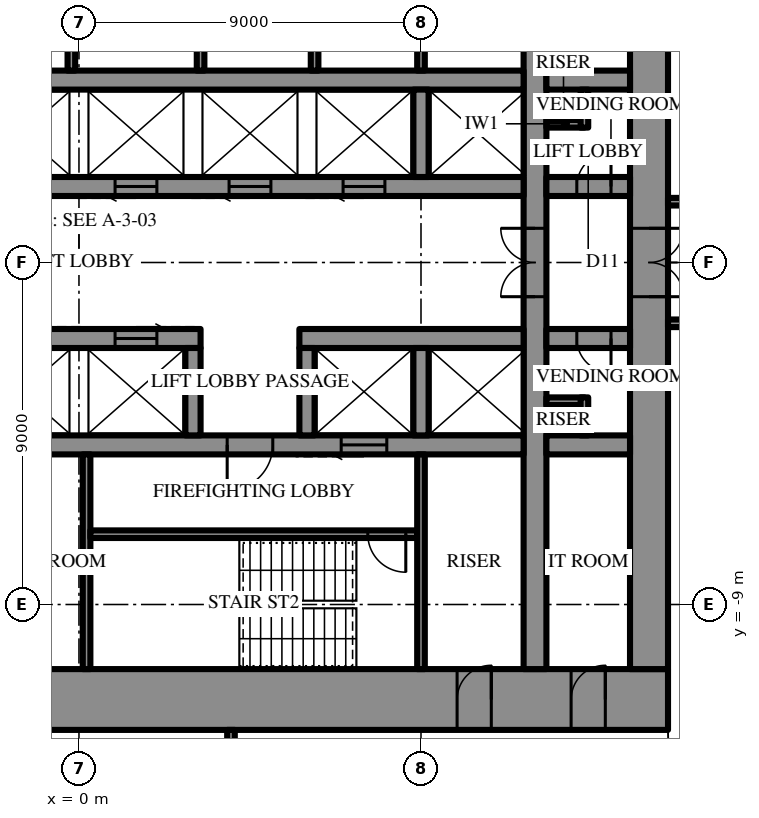
"""IFC4 building model, lengths in metres.
Left out: names, types, materials, properties, quantities, classifications, styles, units other than length and angle.
Written with IfcOpenShell. Run it as: python <this file> out.ifc"""

import sys

from ifc_helpers import new_model, si_unit, direction, frame, frame_2d, origin, place, context, subcontext, project, spatial, rectangle, extrude, element, fill, save


model = new_model("IFC4")
c1 = context("Model", 3, precision=1e-05, world=origin(), true_north=direction((0.0, 1.0)))
c2 = subcontext(c1, "Body", "Model", "MODEL_VIEW")
j1 = project(units=[si_unit("LENGTHUNIT", "METRE"), si_unit("PLANEANGLEUNIT", "RADIAN")], contexts=[c1])
p1 = place(None, origin())
s1 = spatial("IfcSite", under=j1, at=p1, CompositionType="ELEMENT")
p2 = place(p1, origin())
s2 = spatial("IfcBuilding", under=s1, at=p2, CompositionType="ELEMENT")
p3 = place(p2, frame((0.0, 0.0, 223.9)))
s3 = spatial("IfcBuildingStorey", under=s2, at=p3, CompositionType="ELEMENT", Elevation=223.9)
p4 = place(p3, frame((15.5, -11.5, 0.0), z_axis=(0.0, 0.0, 1.0), x_axis=(-1.0, 0.0, 0.0)))
e1 = element("IfcWall", 1, at=p4, inside=s3, PredefinedType="SHEAR", context=c2, shape_type="SweptSolid", body=[
    extrude(rectangle(XDim=31.0, YDim=1.6, at=frame_2d((15.5, 0.0))), origin(), (0.0, 0.0, 1.0), 4.2),
])
p5 = place(p4, frame((16.35, 0.0, 0.0)))
e2 = element("IfcOpeningElement", 2, at=p5, cuts=e1, PredefinedType="OPENING", context=c2, shape_type="SweptSolid", body=[
    extrude(rectangle(XDim=0.9, YDim=2.2, at=frame_2d((0.45, 1.1))), frame((0.0, 0.81, 0.0), z_axis=(0.0, -1.0, 0.0), x_axis=(1.0, 0.0, 0.0)), (0.0, 0.0, 1.0), 1.62),
])
p6 = place(p4, frame((19.35, 0.0, 0.0)))
e3 = element("IfcOpeningElement", 3, at=p6, cuts=e1, PredefinedType="OPENING", context=c2, shape_type="SweptSolid", body=[
    extrude(rectangle(XDim=0.9, YDim=2.2, at=frame_2d((0.45, 1.1))), frame((0.0, 0.81, 0.0), z_axis=(0.0, -1.0, 0.0), x_axis=(1.0, 0.0, 0.0)), (0.0, 0.0, 1.0), 1.62),
])
p7 = place(p4, frame((22.4, 0.0, 0.0)))
e4 = element("IfcOpeningElement", 4, at=p7, cuts=e1, PredefinedType="OPENING", context=c2, shape_type="SweptSolid", body=[
    extrude(rectangle(XDim=1.0, YDim=2.2, at=frame_2d((0.5, 1.1))), frame((0.0, 0.81, 0.0), z_axis=(0.0, -1.0, 0.0), x_axis=(1.0, 0.0, 0.0)), (0.0, 0.0, 1.0), 1.62),
])
p8 = place(p4, frame((1.65, 0.0, 0.0)))
e5 = element("IfcOpeningElement", 5, at=p8, cuts=e1, PredefinedType="OPENING", context=c2, shape_type="SweptSolid", body=[
    extrude(rectangle(XDim=0.9, YDim=2.2, at=frame_2d((0.45, 1.1))), frame((0.0, 0.81, 0.0), z_axis=(0.0, -1.0, 0.0), x_axis=(1.0, 0.0, 0.0)), (0.0, 0.0, 1.0), 1.62),
])
p9 = place(p4, frame((4.65, 0.0, 0.0)))
e6 = element("IfcOpeningElement", 6, at=p9, cuts=e1, PredefinedType="OPENING", context=c2, shape_type="SweptSolid", body=[
    extrude(rectangle(XDim=0.9, YDim=2.2, at=frame_2d((0.45, 1.1))), frame((0.0, 0.81, 0.0), z_axis=(0.0, -1.0, 0.0), x_axis=(1.0, 0.0, 0.0)), (0.0, 0.0, 1.0), 1.62),
])
p10 = place(p4, frame((25.45, 0.0, 0.0)))
e7 = element("IfcOpeningElement", 7, at=p10, cuts=e1, PredefinedType="OPENING", context=c2, shape_type="SweptSolid", body=[
    extrude(rectangle(XDim=0.9, YDim=2.2, at=frame_2d((0.45, 1.1))), frame((0.0, 0.81, 0.0), z_axis=(0.0, -1.0, 0.0), x_axis=(1.0, 0.0, 0.0)), (0.0, 0.0, 1.0), 1.62),
])
p11 = place(p4, frame((28.45, 0.0, 0.0)))
e8 = element("IfcOpeningElement", 8, at=p11, cuts=e1, PredefinedType="OPENING", context=c2, shape_type="SweptSolid", body=[
    extrude(rectangle(XDim=0.9, YDim=2.2, at=frame_2d((0.45, 1.1))), frame((0.0, 0.81, 0.0), z_axis=(0.0, -1.0, 0.0), x_axis=(1.0, 0.0, 0.0)), (0.0, 0.0, 1.0), 1.62),
])
p12 = place(p3, frame((15.0, -10.7, 0.0), z_axis=(0.0, 0.0, 1.0), x_axis=(0.0, 1.0, 0.0)))
e9 = element("IfcWall", 9, at=p12, inside=s3, PredefinedType="SHEAR", context=c2, shape_type="SweptSolid", body=[
    extrude(rectangle(XDim=21.4, YDim=1.0, at=frame_2d((10.7, 0.0))), origin(), (0.0, 0.0, 1.0), 4.2),
])
p13 = place(p12, frame((9.8, 0.0, 0.0)))
e10 = element("IfcOpeningElement", 10, at=p13, cuts=e9, PredefinedType="OPENING", context=c2, shape_type="SweptSolid", body=[
    extrude(rectangle(XDim=1.8, YDim=2.4, at=frame_2d((0.9, 1.2))), frame((0.0, 0.51, 0.0), z_axis=(0.0, -1.0, 0.0), x_axis=(1.0, 0.0, 0.0)), (0.0, 0.0, 1.0), 1.02),
])
p14 = place(p3, frame((12.0, -10.7, 0.0), z_axis=(0.0, 0.0, 1.0), x_axis=(0.0, 1.0, 0.0)))
e11 = element("IfcWall", 11, at=p14, inside=s3, PredefinedType="SHEAR", context=c2, shape_type="SweptSolid", body=[
    extrude(rectangle(XDim=21.4, YDim=0.6, at=frame_2d((10.7, 0.0))), origin(), (0.0, 0.0, 1.0), 4.2),
])
p15 = place(p14, frame((9.8, 0.0, 0.0)))
e12 = element("IfcOpeningElement", 12, at=p15, cuts=e11, PredefinedType="OPENING", context=c2, shape_type="SweptSolid", body=[
    extrude(rectangle(XDim=1.8, YDim=2.4, at=frame_2d((0.9, 1.2))), frame((0.0, 0.31, 0.0), z_axis=(0.0, -1.0, 0.0), x_axis=(1.0, 0.0, 0.0)), (0.0, 0.0, 1.0), 0.62),
])
p16 = place(p3, frame((-3.2, 2.0, 0.0), z_axis=(0.0, 0.0, 1.0), x_axis=(1.0, 0.0, 0.0)))
e13 = element("IfcWall", 13, at=p16, inside=s3, PredefinedType="SHEAR", context=c2, shape_type="SweptSolid", body=[
    extrude(rectangle(XDim=14.9, YDim=0.5, at=frame_2d((7.45, 0.0))), origin(), (0.0, 0.0, 1.0), 4.2),
])
p17 = place(p16, frame((1.15, 0.0, 0.0)))
e14 = element("IfcOpeningElement", 14, at=p17, cuts=e13, PredefinedType="OPENING", context=c2, shape_type="SweptSolid", body=[
    extrude(rectangle(XDim=1.1, YDim=2.2, at=frame_2d((0.55, 1.1))), frame((0.0, 0.26, 0.0), z_axis=(0.0, -1.0, 0.0), x_axis=(1.0, 0.0, 0.0)), (0.0, 0.0, 1.0), 0.52),
])
p18 = place(p16, frame((4.15, 0.0, 0.0)))
e15 = element("IfcOpeningElement", 15, at=p18, cuts=e13, PredefinedType="OPENING", context=c2, shape_type="SweptSolid", body=[
    extrude(rectangle(XDim=1.1, YDim=2.2, at=frame_2d((0.55, 1.1))), frame((0.0, 0.26, 0.0), z_axis=(0.0, -1.0, 0.0), x_axis=(1.0, 0.0, 0.0)), (0.0, 0.0, 1.0), 0.52),
])
p19 = place(p16, frame((7.15, 0.0, 0.0)))
e16 = element("IfcOpeningElement", 16, at=p19, cuts=e13, PredefinedType="OPENING", context=c2, shape_type="SweptSolid", body=[
    extrude(rectangle(XDim=1.1, YDim=2.2, at=frame_2d((0.55, 1.1))), frame((0.0, 0.26, 0.0), z_axis=(0.0, -1.0, 0.0), x_axis=(1.0, 0.0, 0.0)), (0.0, 0.0, 1.0), 0.52),
])
p20 = place(p16, frame((10.15, 0.0, 0.0)))
e17 = element("IfcOpeningElement", 17, at=p20, cuts=e13, PredefinedType="OPENING", context=c2, shape_type="SweptSolid", body=[
    extrude(rectangle(XDim=1.1, YDim=2.2, at=frame_2d((0.55, 1.1))), frame((0.0, 0.26, 0.0), z_axis=(0.0, -1.0, 0.0), x_axis=(1.0, 0.0, 0.0)), (0.0, 0.0, 1.0), 0.52),
])
p21 = place(p3, frame((12.3, 2.0, 0.0), z_axis=(0.0, 0.0, 1.0), x_axis=(1.0, 0.0, 0.0)))
e18 = element("IfcWall", 18, at=p21, inside=s3, PredefinedType="SHEAR", context=c2, shape_type="SweptSolid", body=[
    extrude(rectangle(XDim=2.2, YDim=0.5, at=frame_2d((1.1, 0.0))), origin(), (0.0, 0.0, 1.0), 4.2),
])
p22 = place(p21, frame((0.8, 0.0, 0.0)))
e19 = element("IfcOpeningElement", 19, at=p22, cuts=e18, PredefinedType="OPENING", context=c2, shape_type="SweptSolid", body=[
    extrude(rectangle(XDim=0.9, YDim=2.2, at=frame_2d((0.45, 1.1))), frame((0.0, 0.26, 0.0), z_axis=(0.0, -1.0, 0.0), x_axis=(1.0, 0.0, 0.0)), (0.0, 0.0, 1.0), 0.52),
])
p23 = place(p3, frame((-11.7, 4.8, 0.0), z_axis=(0.0, 0.0, 1.0), x_axis=(1.0, 0.0, 0.0)))
e20 = element("IfcWall", 20, at=p23, inside=s3, PredefinedType="SHEAR", context=c2, shape_type="SweptSolid", body=[
    extrude(rectangle(XDim=23.4, YDim=0.5, at=frame_2d((11.7, 0.0))), origin(), (0.0, 0.0, 1.0), 4.2),
])
p24 = place(p23, frame((6.6, 0.0, 0.0)))
e21 = element("IfcOpeningElement", 21, at=p24, cuts=e20, PredefinedType="OPENING", context=c2, shape_type="SweptSolid", body=[
    extrude(rectangle(XDim=1.2, YDim=2.2, at=frame_2d((0.6, 1.1))), frame((0.0, 0.26, 0.0), z_axis=(0.0, -1.0, 0.0), x_axis=(1.0, 0.0, 0.0)), (0.0, 0.0, 1.0), 0.52),
])
p25 = place(p23, frame((3.6, 0.0, 0.0)))
e22 = element("IfcOpeningElement", 22, at=p25, cuts=e20, PredefinedType="OPENING", context=c2, shape_type="SweptSolid", body=[
    extrude(rectangle(XDim=1.2, YDim=2.2, at=frame_2d((0.6, 1.1))), frame((0.0, 0.26, 0.0), z_axis=(0.0, -1.0, 0.0), x_axis=(1.0, 0.0, 0.0)), (0.0, 0.0, 1.0), 0.52),
])
p26 = place(p3, frame((12.3, 4.8, 0.0), z_axis=(0.0, 0.0, 1.0), x_axis=(1.0, 0.0, 0.0)))
e23 = element("IfcWall", 23, at=p26, inside=s3, PredefinedType="SHEAR", context=c2, shape_type="SweptSolid", body=[
    extrude(rectangle(XDim=2.2, YDim=0.5, at=frame_2d((1.1, 0.0))), origin(), (0.0, 0.0, 1.0), 4.2),
])
p27 = place(p3, frame((9.0, 2.25, 0.0), z_axis=(0.0, 0.0, 1.0), x_axis=(0.0, 1.0, 0.0)))
e24 = element("IfcWall", 24, at=p27, inside=s3, PredefinedType="SHEAR", context=c2, shape_type="SweptSolid", body=[
    extrude(rectangle(XDim=2.3, YDim=0.4, at=frame_2d((1.15, 0.0))), origin(), (0.0, 0.0, 1.0), 4.2),
])
p28 = place(p3, frame((-0.2, 5.05, 0.0), z_axis=(0.0, 0.0, 1.0), x_axis=(0.0, 1.0, 0.0)))
e25 = element("IfcWall", 25, at=p28, inside=s3, PredefinedType="SHEAR", context=c2, shape_type="SweptSolid", body=[
    extrude(rectangle(XDim=5.65, YDim=0.2, at=frame_2d((2.825, 0.0))), origin(), (0.0, 0.0, 1.0), 4.2),
])
p29 = place(p3, frame((14.5, -2.0, 0.0), z_axis=(0.0, 0.0, 1.0), x_axis=(-1.0, 0.0, 0.0)))
e26 = element("IfcWall", 26, at=p29, inside=s3, PredefinedType="SHEAR", context=c2, shape_type="SweptSolid", body=[
    extrude(rectangle(XDim=2.2, YDim=0.5, at=frame_2d((1.1, 0.0))), origin(), (0.0, 0.0, 1.0), 4.2),
])
p30 = place(p29, frame((0.5, 0.0, 0.0)))
e27 = element("IfcOpeningElement", 27, at=p30, cuts=e26, PredefinedType="OPENING", context=c2, shape_type="SweptSolid", body=[
    extrude(rectangle(XDim=0.9, YDim=2.2, at=frame_2d((0.45, 1.1))), frame((0.0, 0.26, 0.0), z_axis=(0.0, -1.0, 0.0), x_axis=(1.0, 0.0, 0.0)), (0.0, 0.0, 1.0), 0.52),
])
p31 = place(p3, frame((11.7, -2.0, 0.0), z_axis=(0.0, 0.0, 1.0), x_axis=(-1.0, 0.0, 0.0)))
e28 = element("IfcWall", 28, at=p31, inside=s3, PredefinedType="SHEAR", context=c2, shape_type="SweptSolid", body=[
    extrude(rectangle(XDim=5.9, YDim=0.5, at=frame_2d((2.95, 0.0))), origin(), (0.0, 0.0, 1.0), 4.2),
])
p32 = place(p3, frame((3.2, -2.0, 0.0), z_axis=(0.0, 0.0, 1.0), x_axis=(-1.0, 0.0, 0.0)))
e29 = element("IfcWall", 29, at=p32, inside=s3, PredefinedType="SHEAR", context=c2, shape_type="SweptSolid", body=[
    extrude(rectangle(XDim=14.9, YDim=0.5, at=frame_2d((7.45, 0.0))), origin(), (0.0, 0.0, 1.0), 4.2),
])
p33 = place(p32, frame((1.15, 0.0, 0.0)))
e30 = element("IfcOpeningElement", 30, at=p33, cuts=e29, PredefinedType="OPENING", context=c2, shape_type="SweptSolid", body=[
    extrude(rectangle(XDim=1.1, YDim=2.2, at=frame_2d((0.55, 1.1))), frame((0.0, 0.26, 0.0), z_axis=(0.0, -1.0, 0.0), x_axis=(1.0, 0.0, 0.0)), (0.0, 0.0, 1.0), 0.52),
])
p34 = place(p32, frame((4.15, 0.0, 0.0)))
e31 = element("IfcOpeningElement", 31, at=p34, cuts=e29, PredefinedType="OPENING", context=c2, shape_type="SweptSolid", body=[
    extrude(rectangle(XDim=1.1, YDim=2.2, at=frame_2d((0.55, 1.1))), frame((0.0, 0.26, 0.0), z_axis=(0.0, -1.0, 0.0), x_axis=(1.0, 0.0, 0.0)), (0.0, 0.0, 1.0), 0.52),
])
p35 = place(p32, frame((7.15, 0.0, 0.0)))
e32 = element("IfcOpeningElement", 32, at=p35, cuts=e29, PredefinedType="OPENING", context=c2, shape_type="SweptSolid", body=[
    extrude(rectangle(XDim=1.1, YDim=2.2, at=frame_2d((0.55, 1.1))), frame((0.0, 0.26, 0.0), z_axis=(0.0, -1.0, 0.0), x_axis=(1.0, 0.0, 0.0)), (0.0, 0.0, 1.0), 0.52),
])
p36 = place(p32, frame((10.15, 0.0, 0.0)))
e33 = element("IfcOpeningElement", 33, at=p36, cuts=e29, PredefinedType="OPENING", context=c2, shape_type="SweptSolid", body=[
    extrude(rectangle(XDim=1.1, YDim=2.2, at=frame_2d((0.55, 1.1))), frame((0.0, 0.26, 0.0), z_axis=(0.0, -1.0, 0.0), x_axis=(1.0, 0.0, 0.0)), (0.0, 0.0, 1.0), 0.52),
])
p37 = place(p3, frame((14.5, -4.8, 0.0), z_axis=(0.0, 0.0, 1.0), x_axis=(-1.0, 0.0, 0.0)))
e34 = element("IfcWall", 34, at=p37, inside=s3, PredefinedType="SHEAR", context=c2, shape_type="SweptSolid", body=[
    extrude(rectangle(XDim=2.2, YDim=0.5, at=frame_2d((1.1, 0.0))), origin(), (0.0, 0.0, 1.0), 4.2),
])
p38 = place(p3, frame((11.7, -4.8, 0.0), z_axis=(0.0, 0.0, 1.0), x_axis=(-1.0, 0.0, 0.0)))
e35 = element("IfcWall", 35, at=p38, inside=s3, PredefinedType="SHEAR", context=c2, shape_type="SweptSolid", body=[
    extrude(rectangle(XDim=23.4, YDim=0.5, at=frame_2d((11.7, 0.0))), origin(), (0.0, 0.0, 1.0), 4.2),
])
p39 = place(p38, frame((6.6, 0.0, 0.0)))
e36 = element("IfcOpeningElement", 36, at=p39, cuts=e35, PredefinedType="OPENING", context=c2, shape_type="SweptSolid", body=[
    extrude(rectangle(XDim=1.2, YDim=2.2, at=frame_2d((0.6, 1.1))), frame((0.0, 0.26, 0.0), z_axis=(0.0, -1.0, 0.0), x_axis=(1.0, 0.0, 0.0)), (0.0, 0.0, 1.0), 0.52),
])
p40 = place(p38, frame((3.6, 0.0, 0.0)))
e37 = element("IfcOpeningElement", 37, at=p40, cuts=e35, PredefinedType="OPENING", context=c2, shape_type="SweptSolid", body=[
    extrude(rectangle(XDim=1.2, YDim=2.2, at=frame_2d((0.6, 1.1))), frame((0.0, 0.26, 0.0), z_axis=(0.0, -1.0, 0.0), x_axis=(1.0, 0.0, 0.0)), (0.0, 0.0, 1.0), 0.52),
])
for number, where, z_axis, x_axis in (
    (38, (9.0, -2.25, 0.0), (0.0, 0.0, 1.0), (0.0, -1.0, 0.0)),
    (39, (6.0, -2.25, 0.0), (0.0, 0.0, 1.0), (0.0, -1.0, 0.0)),
    (40, (3.0, -2.25, 0.0), (0.0, 0.0, 1.0), (0.0, -1.0, 0.0)),
):
    element("IfcWall", number, at=place(p3, frame(where, z_axis=z_axis, x_axis=x_axis)), inside=s3, PredefinedType="SHEAR", context=c2, shape_type="SweptSolid", body=[
        extrude(rectangle(XDim=2.3, YDim=0.4, at=frame_2d((1.15, 0.0))), origin(), (0.0, 0.0, 1.0), 4.2),
    ])
p41 = place(p3, frame((0.2, -5.05, 0.0), z_axis=(0.0, 0.0, 1.0), x_axis=(0.0, -1.0, 0.0)))
e41 = element("IfcWall", 41, at=p41, inside=s3, PredefinedType="SHEAR", context=c2, shape_type="SweptSolid", body=[
    extrude(rectangle(XDim=5.65, YDim=0.2, at=frame_2d((2.825, 0.0))), origin(), (0.0, 0.0, 1.0), 4.2),
])
p42 = place(p3, frame((8.9, -7.15, 0.0), z_axis=(0.0, 0.0, 1.0), x_axis=(-1.0, 0.0, 0.0)))
e42 = element("IfcWall", 42, at=p42, inside=s3, PredefinedType="SHEAR", context=c2, shape_type="SweptSolid", body=[
    extrude(rectangle(XDim=8.6, YDim=0.2, at=frame_2d((4.3, 0.0))), origin(), (0.0, 0.0, 1.0), 4.2),
])
p43 = place(p42, frame((0.3, 0.0, 0.0)))
e43 = element("IfcOpeningElement", 43, at=p43, cuts=e42, PredefinedType="OPENING", context=c2, shape_type="SweptSolid", body=[
    extrude(rectangle(XDim=1.0, YDim=2.2, at=frame_2d((0.5, 1.1))), frame((0.0, 0.11, 0.0), z_axis=(0.0, -1.0, 0.0), x_axis=(1.0, 0.0, 0.0)), (0.0, 0.0, 1.0), 0.22),
])
for number, where, z_axis, x_axis in (
    (44, (9.0, 5.05, 0.0), (0.0, 0.0, 1.0), (0.0, 1.0, 0.0)),
    (45, (3.2, 5.05, 0.0), (0.0, 0.0, 1.0), (0.0, 1.0, 0.0)),
    (46, (6.2, 5.05, 0.0), (0.0, 0.0, 1.0), (0.0, 1.0, 0.0)),
    (47, (9.0, -5.05, 0.0), (0.0, 0.0, 1.0), (0.0, -1.0, 0.0)),
):
    element("IfcWall", number, at=place(p3, frame(where, z_axis=z_axis, x_axis=x_axis)), inside=s3, PredefinedType="PARTITIONING", context=c2, shape_type="SweptSolid", body=[
        extrude(rectangle(XDim=5.65, YDim=0.2, at=frame_2d((2.825, 0.0))), origin(), (0.0, 0.0, 1.0), 4.0),
    ])
for number, where, z_axis, x_axis in (
    (48, (12.3, 3.65, 0.0), (0.0, 0.0, 1.0), (1.0, 0.0, 0.0)),
    (49, (13.3, 3.55, 0.0), (0.0, 0.0, 1.0), (0.0, 1.0, 0.0)),
    (50, (13.3, -3.65, 0.0), (0.0, 0.0, 1.0), (-1.0, 0.0, 0.0)),
    (51, (13.3, -3.55, 0.0), (0.0, 0.0, 1.0), (0.0, -1.0, 0.0)),
):
    element("IfcWall", number, at=place(p3, frame(where, z_axis=z_axis, x_axis=x_axis)), inside=s3, PredefinedType="PARTITIONING", context=c2, shape_type="SweptSolid", body=[
        extrude(rectangle(XDim=1.0, YDim=0.2, at=frame_2d((0.5, 0.0))), origin(), (0.0, 0.0, 1.0), 4.0),
    ])
for number, where, z_axis, x_axis in (
    (52, (15.5, 1.6, 0.0), (0.0, 0.0, 1.0), (1.0, 0.0, 0.0)),
    (53, (15.5, -1.6, 0.0), (0.0, 0.0, 1.0), (1.0, 0.0, 0.0)),
):
    element("IfcWall", number, at=place(p3, frame(where, z_axis=z_axis, x_axis=x_axis)), inside=s3, PredefinedType="PARTITIONING", context=c2, shape_type="SweptSolid", body=[
        extrude(rectangle(XDim=2.3, YDim=0.2, at=frame_2d((1.15, 0.0))), origin(), (0.0, 0.0, 1.0), 4.0),
    ])
p44 = place(p3, frame((4.0, -12.3, 0.0), z_axis=(0.0, 0.0, 1.0), x_axis=(0.0, -1.0, 0.0)))
e54 = element("IfcWall", 54, at=p44, inside=s3, PredefinedType="PARTITIONING", context=c2, shape_type="SweptSolid", body=[
    extrude(rectangle(XDim=15.35, YDim=0.2, at=frame_2d((7.675, 0.0))), origin(), (0.0, 0.0, 1.0), 4.0),
])
p45 = place(p13, frame((1.8, 0.0, 0.0), z_axis=(0.0, 0.0, 1.0), x_axis=(-1.0, 0.0, 0.0)))
e55 = element("IfcDoor", 55, at=p45, inside=s3, OperationType="DOUBLE_DOOR_SINGLE_SWING", PredefinedType="DOOR", context=c2, shape_type="SweptSolid", body=[
    extrude(rectangle(XDim=1.8, YDim=2.4, at=frame_2d((0.9, 1.2))), frame((0.0, 0.025, 0.0), z_axis=(0.0, -1.0, 0.0), x_axis=(1.0, 0.0, 0.0)), (0.0, 0.0, 1.0), 0.05),
])
fill(e10, e55)
p46 = place(p39, origin())
e56 = element("IfcDoor", 56, at=p46, inside=s3, OperationType="SINGLE_SWING_LEFT", PredefinedType="DOOR", context=c2, shape_type="SweptSolid", body=[
    extrude(rectangle(XDim=1.2, YDim=2.2, at=frame_2d((0.6, 1.1))), frame((0.0, 0.025, 0.0), z_axis=(0.0, -1.0, 0.0), x_axis=(1.0, 0.0, 0.0)), (0.0, 0.0, 1.0), 0.05),
])
fill(e36, e56)
p47 = place(p43, origin())
e57 = element("IfcDoor", 57, at=p47, inside=s3, OperationType="SINGLE_SWING_RIGHT", PredefinedType="DOOR", context=c2, shape_type="SweptSolid", body=[
    extrude(rectangle(XDim=1.0, YDim=2.2, at=frame_2d((0.5, 1.1))), frame((0.0, 0.025, 0.0), z_axis=(0.0, -1.0, 0.0), x_axis=(1.0, 0.0, 0.0)), (0.0, 0.0, 1.0), 0.05),
])
fill(e43, e57)
p48 = place(p8, frame((0.9, 0.0, 0.0), z_axis=(0.0, 0.0, 1.0), x_axis=(-1.0, 0.0, 0.0)))
e58 = element("IfcDoor", 58, at=p48, inside=s3, OperationType="SINGLE_SWING_LEFT", PredefinedType="DOOR", context=c2, shape_type="SweptSolid", body=[
    extrude(rectangle(XDim=0.9, YDim=2.2, at=frame_2d((0.45, 1.1))), frame((0.0, 0.025, 0.0), z_axis=(0.0, -1.0, 0.0), x_axis=(1.0, 0.0, 0.0)), (0.0, 0.0, 1.0), 0.05),
])
fill(e5, e58)
p49 = place(p9, frame((0.9, 0.0, 0.0), z_axis=(0.0, 0.0, 1.0), x_axis=(-1.0, 0.0, 0.0)))
e59 = element("IfcDoor", 59, at=p49, inside=s3, OperationType="SINGLE_SWING_LEFT", PredefinedType="DOOR", context=c2, shape_type="SweptSolid", body=[
    extrude(rectangle(XDim=0.9, YDim=2.2, at=frame_2d((0.45, 1.1))), frame((0.0, 0.025, 0.0), z_axis=(0.0, -1.0, 0.0), x_axis=(1.0, 0.0, 0.0)), (0.0, 0.0, 1.0), 0.05),
])
fill(e6, e59)
p50 = place(p22, origin())
e60 = element("IfcDoor", 60, at=p50, inside=s3, OperationType="SINGLE_SWING_LEFT", PredefinedType="DOOR", context=c2, shape_type="SweptSolid", body=[
    extrude(rectangle(XDim=0.9, YDim=2.2, at=frame_2d((0.45, 1.1))), frame((0.0, 0.025, 0.0), z_axis=(0.0, -1.0, 0.0), x_axis=(1.0, 0.0, 0.0)), (0.0, 0.0, 1.0), 0.05),
])
fill(e19, e60)
p51 = place(p30, origin())
e61 = element("IfcDoor", 61, at=p51, inside=s3, OperationType="SINGLE_SWING_RIGHT", PredefinedType="DOOR", context=c2, shape_type="SweptSolid", body=[
    extrude(rectangle(XDim=0.9, YDim=2.2, at=frame_2d((0.45, 1.1))), frame((0.0, 0.025, 0.0), z_axis=(0.0, -1.0, 0.0), x_axis=(1.0, 0.0, 0.0)), (0.0, 0.0, 1.0), 0.05),
])
fill(e27, e61)
p52 = place(p15, origin())
e62 = element("IfcDoor", 62, at=p52, inside=s3, OperationType="DOUBLE_DOOR_SINGLE_SWING", PredefinedType="DOOR", context=c2, shape_type="SweptSolid", body=[
    extrude(rectangle(XDim=1.8, YDim=2.4, at=frame_2d((0.9, 1.2))), frame((0.0, 0.025, 0.0), z_axis=(0.0, -1.0, 0.0), x_axis=(1.0, 0.0, 0.0)), (0.0, 0.0, 1.0), 0.05),
])
fill(e12, e62)
p53 = place(p18, frame((1.1, 0.0, 0.0), z_axis=(0.0, 0.0, 1.0), x_axis=(-1.0, 0.0, 0.0)))
e63 = element("IfcDoor", 63, at=p53, inside=s3, OperationType="SLIDING_TO_LEFT", PredefinedType="DOOR", context=c2, shape_type="SweptSolid", body=[
    extrude(rectangle(XDim=1.1, YDim=2.2, at=frame_2d((0.55, 1.1))), frame((0.0, 0.025, 0.0), z_axis=(0.0, -1.0, 0.0), x_axis=(1.0, 0.0, 0.0)), (0.0, 0.0, 1.0), 0.05),
])
fill(e15, e63)
p54 = place(p19, frame((1.1, 0.0, 0.0), z_axis=(0.0, 0.0, 1.0), x_axis=(-1.0, 0.0, 0.0)))
e64 = element("IfcDoor", 64, at=p54, inside=s3, OperationType="SLIDING_TO_LEFT", PredefinedType="DOOR", context=c2, shape_type="SweptSolid", body=[
    extrude(rectangle(XDim=1.1, YDim=2.2, at=frame_2d((0.55, 1.1))), frame((0.0, 0.025, 0.0), z_axis=(0.0, -1.0, 0.0), x_axis=(1.0, 0.0, 0.0)), (0.0, 0.0, 1.0), 0.05),
])
fill(e16, e64)
p55 = place(p20, frame((1.1, 0.0, 0.0), z_axis=(0.0, 0.0, 1.0), x_axis=(-1.0, 0.0, 0.0)))
e65 = element("IfcDoor", 65, at=p55, inside=s3, OperationType="SLIDING_TO_LEFT", PredefinedType="DOOR", context=c2, shape_type="SweptSolid", body=[
    extrude(rectangle(XDim=1.1, YDim=2.2, at=frame_2d((0.55, 1.1))), frame((0.0, 0.025, 0.0), z_axis=(0.0, -1.0, 0.0), x_axis=(1.0, 0.0, 0.0)), (0.0, 0.0, 1.0), 0.05),
])
fill(e17, e65)
p56 = place(p40, origin())
e66 = element("IfcDoor", 66, at=p56, inside=s3, OperationType="SLIDING_TO_LEFT", PredefinedType="DOOR", context=c2, shape_type="SweptSolid", body=[
    extrude(rectangle(XDim=1.2, YDim=2.2, at=frame_2d((0.6, 1.1))), frame((0.0, 0.025, 0.0), z_axis=(0.0, -1.0, 0.0), x_axis=(1.0, 0.0, 0.0)), (0.0, 0.0, 1.0), 0.05),
])
fill(e37, e66)
p57 = place(p33, frame((1.1, 0.0, 0.0), z_axis=(0.0, 0.0, 1.0), x_axis=(-1.0, 0.0, 0.0)))
e67 = element("IfcDoor", 67, at=p57, inside=s3, OperationType="SLIDING_TO_LEFT", PredefinedType="DOOR", context=c2, shape_type="SweptSolid", body=[
    extrude(rectangle(XDim=1.1, YDim=2.2, at=frame_2d((0.55, 1.1))), frame((0.0, 0.025, 0.0), z_axis=(0.0, -1.0, 0.0), x_axis=(1.0, 0.0, 0.0)), (0.0, 0.0, 1.0), 0.05),
])
fill(e30, e67)
save(model, sys.argv[1])
